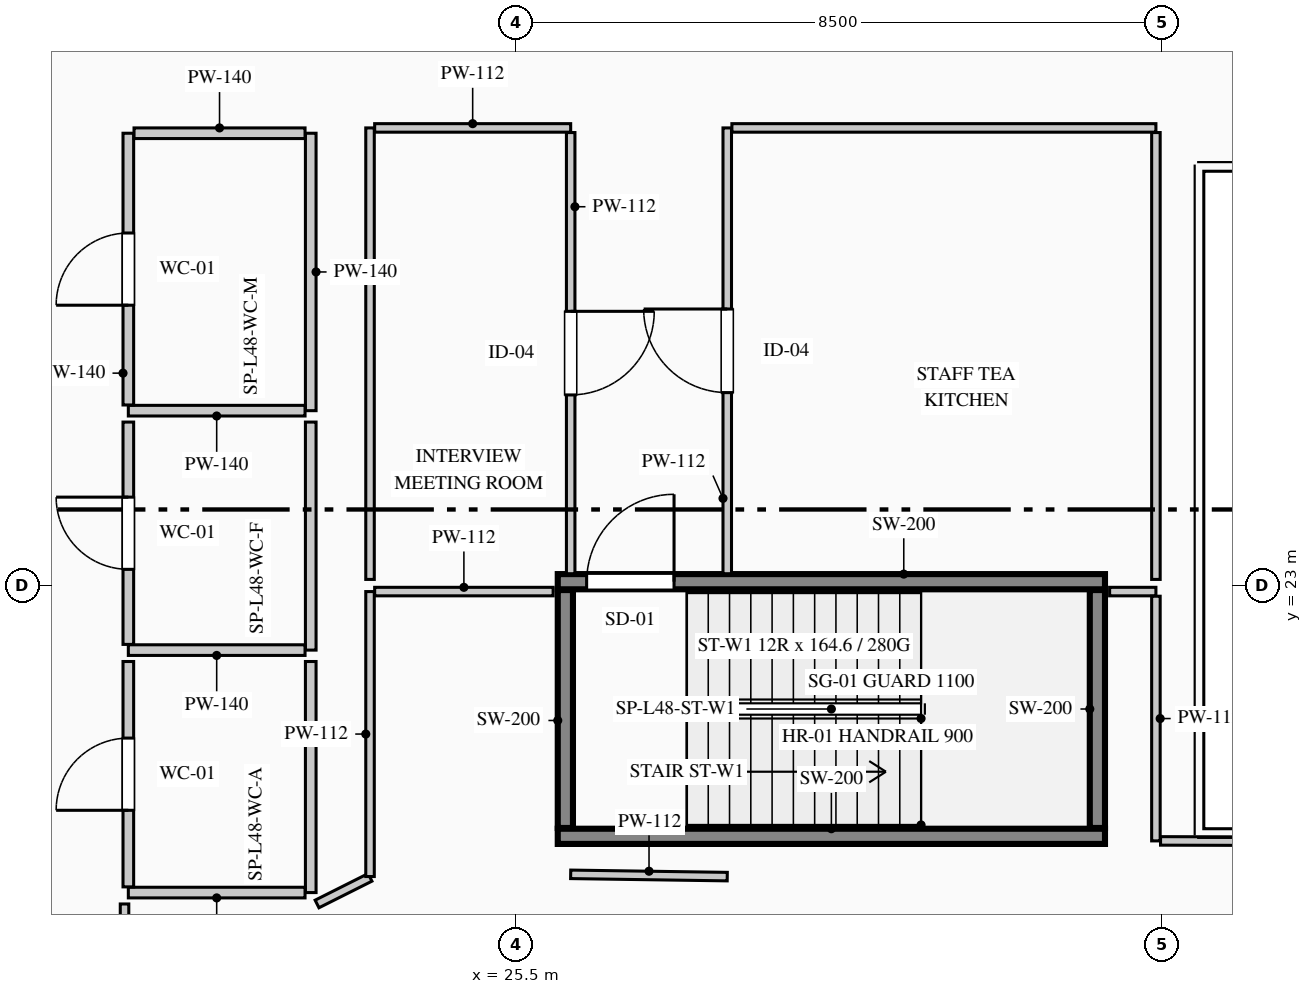
"""IFC4 building model, lengths in metres.
Left out: names, types, materials, properties, quantities, classifications, styles, units other than length and angle.
Written with IfcOpenShell. Run it as: python <this file> out.ifc"""

import sys

from ifc_helpers import new_model, si_unit, direction, frame, frame_2d, origin, place, context, subcontext, project, spatial, rectangle, extrude, element, fill, save


model = new_model("IFC4")
c1 = context("Model", 3, precision=1e-05, world=origin(), true_north=direction((0.0, 1.0)))
c2 = subcontext(c1, "Body", "Model", "MODEL_VIEW")
j1 = project(units=[si_unit("LENGTHUNIT", "METRE"), si_unit("PLANEANGLEUNIT", "RADIAN")], contexts=[c1])
p1 = place(None, origin())
s1 = spatial("IfcSite", under=j1, at=p1, CompositionType="ELEMENT")
p2 = place(p1, origin())
s2 = spatial("IfcBuilding", under=s1, at=p2, CompositionType="ELEMENT")
p3 = place(p2, frame((0.0, 0.0, 203.5)))
s3 = spatial("IfcBuildingStorey", under=s2, at=p3, CompositionType="ELEMENT", Elevation=203.5)
p4 = place(p3, frame((26.05, 19.7, 0.0), z_axis=(0.0, 0.0, 1.0), x_axis=(1.0, 0.0, 0.0)))
e1 = element("IfcWall", 1, at=p4, inside=s3, PredefinedType="SHEAR", context=c2, shape_type="SweptSolid", body=[
    extrude(rectangle(XDim=7.2, YDim=0.2, at=frame_2d((3.6, 0.0))), origin(), (0.0, 0.0, 1.0), 3.95),
])
p5 = place(p3, frame((26.05, 23.05, 0.0), z_axis=(0.0, 0.0, 1.0), x_axis=(1.0, 0.0, 0.0)))
e2 = element("IfcWall", 2, at=p5, inside=s3, PredefinedType="SHEAR", context=c2, shape_type="SweptSolid", body=[
    extrude(rectangle(XDim=7.2, YDim=0.2, at=frame_2d((3.6, 0.0))), origin(), (0.0, 0.0, 1.0), 3.95),
])
p6 = place(p5, frame((0.38, 0.0, 0.0)))
e3 = element("IfcOpeningElement", 3, at=p6, cuts=e2, PredefinedType="OPENING", context=c2, shape_type="SweptSolid", body=[
    extrude(rectangle(XDim=1.15, YDim=2.2, at=frame_2d((0.575, 1.1))), frame((0.0, 0.11, 0.0), z_axis=(0.0, -1.0, 0.0), x_axis=(1.0, 0.0, 0.0)), (0.0, 0.0, 1.0), 0.22),
])
for number, where, z_axis, x_axis in (
    (4, (26.15, 19.81, 0.0), (0.0, 0.0, 1.0), (0.0, 1.0, 0.0)),
    (5, (33.15, 19.81, 0.0), (0.0, 0.0, 1.0), (0.0, 1.0, 0.0)),
):
    element("IfcWall", number, at=place(p3, frame(where, z_axis=z_axis, x_axis=x_axis)), inside=s3, PredefinedType="SHEAR", context=c2, shape_type="SweptSolid", body=[
        extrude(rectangle(XDim=3.13, YDim=0.2, at=frame_2d((1.565, 0.0))), origin(), (0.0, 0.0, 1.0), 3.95),
    ])
p7 = place(p3, frame((22.8, 28.95, 0.0), z_axis=(0.0, 0.0, 1.0), x_axis=(0.0, -1.0, 0.0)))
e6 = element("IfcWall", 6, at=p7, inside=s3, PredefinedType="PARTITIONING", context=c2, shape_type="SweptSolid", body=[
    extrude(rectangle(XDim=3.65, YDim=0.14, at=frame_2d((1.825, 0.0))), origin(), (0.0, 0.0, 1.0), 3.285),
])
p8 = place(p3, frame((22.725, 25.3, 0.0), z_axis=(0.0, 0.0, 1.0), x_axis=(-1.0, 0.0, 0.0)))
e7 = element("IfcWall", 7, at=p8, inside=s3, PredefinedType="PARTITIONING", context=c2, shape_type="SweptSolid", body=[
    extrude(rectangle(XDim=2.325, YDim=0.14, at=frame_2d((1.163, 0.0))), origin(), (0.0, 0.0, 1.0), 3.7),
])
p9 = place(p3, frame((20.4, 25.375, 0.0), z_axis=(0.0, 0.0, 1.0), x_axis=(0.0, 1.0, 0.0)))
e8 = element("IfcWall", 8, at=p9, inside=s3, PredefinedType="PARTITIONING", context=c2, shape_type="SweptSolid", body=[
    extrude(rectangle(XDim=3.575, YDim=0.14, at=frame_2d((1.788, 0.0))), origin(), (0.0, 0.0, 1.0), 3.7),
])
p10 = place(p9, frame((1.312, 0.0, 0.0)))
e9 = element("IfcOpeningElement", 9, at=p10, cuts=e8, PredefinedType="OPENING", context=c2, shape_type="SweptSolid", body=[
    extrude(rectangle(XDim=0.95, YDim=2.15, at=frame_2d((0.475, 1.075))), frame((0.0, 0.08, 0.0), z_axis=(0.0, -1.0, 0.0), x_axis=(1.0, 0.0, 0.0)), (0.0, 0.0, 1.0), 0.16),
])
p11 = place(p3, frame((20.475, 28.95, 0.0), z_axis=(0.0, 0.0, 1.0), x_axis=(1.0, 0.0, 0.0)))
e10 = element("IfcWall", 10, at=p11, inside=s3, PredefinedType="PARTITIONING", context=c2, shape_type="SweptSolid", body=[
    extrude(rectangle(XDim=2.25, YDim=0.14, at=frame_2d((1.125, 0.0))), origin(), (0.0, 0.0, 1.0), 3.7),
])
p12 = place(p3, frame((22.8, 25.15, 0.0), z_axis=(0.0, 0.0, 1.0), x_axis=(0.0, -1.0, 0.0)))
e11 = element("IfcWall", 11, at=p12, inside=s3, PredefinedType="PARTITIONING", context=c2, shape_type="SweptSolid", body=[
    extrude(rectangle(XDim=3.0, YDim=0.14, at=frame_2d((1.5, 0.0))), origin(), (0.0, 0.0, 1.0), 3.285),
])
p13 = place(p3, frame((22.725, 22.15, 0.0), z_axis=(0.0, 0.0, 1.0), x_axis=(-1.0, 0.0, 0.0)))
e12 = element("IfcWall", 12, at=p13, inside=s3, PredefinedType="PARTITIONING", context=c2, shape_type="SweptSolid", body=[
    extrude(rectangle(XDim=2.325, YDim=0.14, at=frame_2d((1.163, 0.0))), origin(), (0.0, 0.0, 1.0), 3.7),
])
p14 = place(p3, frame((20.4, 22.225, 0.0), z_axis=(0.0, 0.0, 1.0), x_axis=(0.0, 1.0, 0.0)))
e13 = element("IfcWall", 13, at=p14, inside=s3, PredefinedType="PARTITIONING", context=c2, shape_type="SweptSolid", body=[
    extrude(rectangle(XDim=2.925, YDim=0.14, at=frame_2d((1.462, 0.0))), origin(), (0.0, 0.0, 1.0), 3.7),
])
p15 = place(p14, frame((0.988, 0.0, 0.0)))
e14 = element("IfcOpeningElement", 14, at=p15, cuts=e13, PredefinedType="OPENING", context=c2, shape_type="SweptSolid", body=[
    extrude(rectangle(XDim=0.95, YDim=2.15, at=frame_2d((0.475, 1.075))), frame((0.0, 0.08, 0.0), z_axis=(0.0, -1.0, 0.0), x_axis=(1.0, 0.0, 0.0)), (0.0, 0.0, 1.0), 0.16),
])
p16 = place(p3, frame((22.8, 22.0, 0.0), z_axis=(0.0, 0.0, 1.0), x_axis=(0.0, -1.0, 0.0)))
e15 = element("IfcWall", 15, at=p16, inside=s3, PredefinedType="PARTITIONING", context=c2, shape_type="SweptSolid", body=[
    extrude(rectangle(XDim=3.04, YDim=0.14, at=frame_2d((1.52, 0.0))), origin(), (0.0, 0.0, 1.0), 3.285),
])
p17 = place(p3, frame((22.725, 18.96, 0.0), z_axis=(0.0, 0.0, 1.0), x_axis=(-1.0, 0.0, 0.0)))
e16 = element("IfcWall", 16, at=p17, inside=s3, PredefinedType="PARTITIONING", context=c2, shape_type="SweptSolid", body=[
    extrude(rectangle(XDim=2.325, YDim=0.14, at=frame_2d((1.163, 0.0))), origin(), (0.0, 0.0, 1.0), 3.7),
])
p18 = place(p3, frame((20.4, 19.035, 0.0), z_axis=(0.0, 0.0, 1.0), x_axis=(0.0, 1.0, 0.0)))
e17 = element("IfcWall", 17, at=p18, inside=s3, PredefinedType="PARTITIONING", context=c2, shape_type="SweptSolid", body=[
    extrude(rectangle(XDim=2.965, YDim=0.14, at=frame_2d((1.482, 0.0))), origin(), (0.0, 0.0, 1.0), 3.7),
])
p19 = place(p18, frame((1.008, 0.0, 0.0)))
e18 = element("IfcOpeningElement", 18, at=p19, cuts=e17, PredefinedType="OPENING", context=c2, shape_type="SweptSolid", body=[
    extrude(rectangle(XDim=0.95, YDim=2.15, at=frame_2d((0.475, 1.075))), frame((0.0, 0.08, 0.0), z_axis=(0.0, -1.0, 0.0), x_axis=(1.0, 0.0, 0.0)), (0.0, 0.0, 1.0), 0.16),
])
p20 = place(p3, frame((33.311, 22.92, 0.0), z_axis=(0.0, 0.0, 1.0), x_axis=(1.0, 0.0, 0.0)))
e19 = element("IfcWall", 19, at=p20, inside=s3, PredefinedType="PARTITIONING", context=c2, shape_type="SweptSolid", body=[
    extrude(rectangle(XDim=0.609, YDim=0.112, at=frame_2d((0.305, 0.0))), origin(), (0.0, 0.0, 1.0), 3.7),
])
p21 = place(p3, frame((33.92, 22.859, 0.0), z_axis=(0.0, 0.0, 1.0), x_axis=(0.0, -1.0, 0.0)))
e20 = element("IfcWall", 20, at=p21, inside=s3, PredefinedType="PARTITIONING", context=c2, shape_type="SweptSolid", body=[
    extrude(rectangle(XDim=3.219, YDim=0.112, at=frame_2d((1.609, 0.0))), origin(), (0.0, 0.0, 1.0), 2.885),
])
p22 = place(p3, frame((33.981, 19.64, 0.0), z_axis=(0.0, 0.0, 1.0), x_axis=(0.999996388808, -0.002687447056, 0.0)))
e21 = element("IfcWall", 21, at=p22, inside=s3, PredefinedType="PARTITIONING", context=c2, shape_type="SweptSolid", body=[
    extrude(rectangle(XDim=9.175, YDim=0.112, at=frame_2d((4.588, 0.0))), origin(), (0.0, 0.0, 1.0), 3.7),
])
p23 = place(p3, frame((20.35, 12.8, 0.0), z_axis=(0.0, 0.0, 1.0), x_axis=(0.0, 1.0, 0.0)))
e22 = element("IfcWall", 22, at=p23, inside=s3, PredefinedType="PARTITIONING", context=c2, shape_type="SweptSolid", body=[
    extrude(rectangle(XDim=6.01, YDim=0.112, at=frame_2d((3.005, 0.0))), origin(), (0.0, 0.0, 1.0), 3.7),
])
p24 = place(p23, frame((2.455, 0.0, 0.0)))
e23 = element("IfcOpeningElement", 23, at=p24, cuts=e22, PredefinedType="OPENING", context=c2, shape_type="SweptSolid", body=[
    extrude(rectangle(XDim=1.1, YDim=2.2, at=frame_2d((0.55, 1.1))), frame((0.0, 0.066, 0.0), z_axis=(0.0, -1.0, 0.0), x_axis=(1.0, 0.0, 0.0)), (0.0, 0.0, 1.0), 0.132),
])
p25 = place(p3, frame((22.883, 18.81, 0.0), z_axis=(0.0, 0.0, 1.0), x_axis=(0.893737436086, 0.448590453909, 0.0)))
e24 = element("IfcWall", 24, at=p25, inside=s3, PredefinedType="PARTITIONING", context=c2, shape_type="SweptSolid", body=[
    extrude(rectangle(XDim=0.78, YDim=0.112, at=frame_2d((0.39, 0.0))), origin(), (0.0, 0.0, 1.0), 3.7),
])
p26 = place(p3, frame((23.58, 19.171, 0.0), z_axis=(0.0, 0.0, 1.0), x_axis=(0.0, 1.0, 0.0)))
e25 = element("IfcWall", 25, at=p26, inside=s3, PredefinedType="PARTITIONING", context=c2, shape_type="SweptSolid", body=[
    extrude(rectangle(XDim=3.749, YDim=0.112, at=frame_2d((1.875, 0.0))), origin(), (0.0, 0.0, 1.0), 3.7),
])
p27 = place(p3, frame((23.641, 22.92, 0.0), z_axis=(0.0, 0.0, 1.0), x_axis=(1.0, 0.0, 0.0)))
e26 = element("IfcWall", 26, at=p27, inside=s3, PredefinedType="PARTITIONING", context=c2, shape_type="SweptSolid", body=[
    extrude(rectangle(XDim=2.348, YDim=0.112, at=frame_2d((1.174, 0.0))), origin(), (0.0, 0.0, 1.0), 3.7),
])
p28 = place(p3, frame((26.22, 19.2, 0.0), z_axis=(0.0, 0.0, 1.0), x_axis=(0.999893773718, -0.014575365509, 0.0)))
e27 = element("IfcWall", 27, at=p28, inside=s3, PredefinedType="PARTITIONING", context=c2, shape_type="SweptSolid", body=[
    extrude(rectangle(XDim=2.06, YDim=0.112, at=frame_2d((1.03, 0.0))), origin(), (0.0, 0.0, 1.0), 3.7),
])
p29 = place(p3, frame((23.58, 23.08, 0.0), z_axis=(0.0, 0.0, 1.0), x_axis=(0.0, 1.0, 0.0)))
e28 = element("IfcWall", 28, at=p29, inside=s3, PredefinedType="PARTITIONING", context=c2, shape_type="SweptSolid", body=[
    extrude(rectangle(XDim=5.94, YDim=0.112, at=frame_2d((2.97, 0.0))), origin(), (0.0, 0.0, 1.0), 3.7),
])
p30 = place(p3, frame((23.641, 29.02, 0.0), z_axis=(0.0, 0.0, 1.0), x_axis=(1.0, 0.0, 0.0)))
e29 = element("IfcWall", 29, at=p30, inside=s3, PredefinedType="PARTITIONING", context=c2, shape_type="SweptSolid", body=[
    extrude(rectangle(XDim=2.579, YDim=0.112, at=frame_2d((1.29, 0.0))), origin(), (0.0, 0.0, 1.0), 3.485),
])
p31 = place(p3, frame((26.22, 28.959, 0.0), z_axis=(0.0, 0.0, 1.0), x_axis=(0.0, -1.0, 0.0)))
e30 = element("IfcWall", 30, at=p31, inside=s3, PredefinedType="PARTITIONING", context=c2, shape_type="SweptSolid", body=[
    extrude(rectangle(XDim=5.804, YDim=0.112, at=frame_2d((2.902, 0.0))), origin(), (0.0, 0.0, 1.0), 3.7),
])
p32 = place(p31, frame((2.352, 0.0, 0.0)))
e31 = element("IfcOpeningElement", 31, at=p32, cuts=e30, PredefinedType="OPENING", context=c2, shape_type="SweptSolid", body=[
    extrude(rectangle(XDim=1.1, YDim=2.2, at=frame_2d((0.55, 1.1))), frame((0.0, 0.066, 0.0), z_axis=(0.0, -1.0, 0.0), x_axis=(1.0, 0.0, 0.0)), (0.0, 0.0, 1.0), 0.132),
])
p33 = place(p3, frame((28.28, 23.155, 0.0), z_axis=(0.0, 0.0, 1.0), x_axis=(0.0, 1.0, 0.0)))
e32 = element("IfcWall", 32, at=p33, inside=s3, PredefinedType="PARTITIONING", context=c2, shape_type="SweptSolid", body=[
    extrude(rectangle(XDim=5.865, YDim=0.112, at=frame_2d((2.933, 0.0))), origin(), (0.0, 0.0, 1.0), 3.7),
])
p34 = place(p33, frame((2.383, 0.0, 0.0)))
e33 = element("IfcOpeningElement", 33, at=p34, cuts=e32, PredefinedType="OPENING", context=c2, shape_type="SweptSolid", body=[
    extrude(rectangle(XDim=1.1, YDim=2.2, at=frame_2d((0.55, 1.1))), frame((0.0, 0.066, 0.0), z_axis=(0.0, -1.0, 0.0), x_axis=(1.0, 0.0, 0.0)), (0.0, 0.0, 1.0), 0.132),
])
p35 = place(p3, frame((28.341, 29.02, 0.0), z_axis=(0.0, 0.0, 1.0), x_axis=(1.0, 0.0, 0.0)))
e34 = element("IfcWall", 34, at=p35, inside=s3, PredefinedType="PARTITIONING", context=c2, shape_type="SweptSolid", body=[
    extrude(rectangle(XDim=5.579, YDim=0.112, at=frame_2d((2.79, 0.0))), origin(), (0.0, 0.0, 1.0), 3.485),
])
p36 = place(p3, frame((33.92, 28.959, 0.0), z_axis=(0.0, 0.0, 1.0), x_axis=(0.0, -1.0, 0.0)))
e35 = element("IfcWall", 35, at=p36, inside=s3, PredefinedType="PARTITIONING", context=c2, shape_type="SweptSolid", body=[
    extrude(rectangle(XDim=5.879, YDim=0.112, at=frame_2d((2.939, 0.0))), origin(), (0.0, 0.0, 1.0), 2.885),
])
p37 = place(p6, origin())
e36 = element("IfcDoor", 36, at=p37, inside=s3, OperationType="SINGLE_SWING_RIGHT", PredefinedType="DOOR", context=c2, shape_type="SweptSolid", body=[
    extrude(rectangle(XDim=1.15, YDim=2.2, at=frame_2d((0.575, 1.1))), frame((0.0, 0.025, 0.0), z_axis=(0.0, -1.0, 0.0), x_axis=(1.0, 0.0, 0.0)), (0.0, 0.0, 1.0), 0.05),
])
fill(e3, e36)
p38 = place(p10, origin())
e37 = element("IfcDoor", 37, at=p38, inside=s3, OperationType="SINGLE_SWING_LEFT", PredefinedType="DOOR", context=c2, shape_type="SweptSolid", body=[
    extrude(rectangle(XDim=0.95, YDim=2.15, at=frame_2d((0.475, 1.075))), frame((0.0, 0.025, 0.0), z_axis=(0.0, -1.0, 0.0), x_axis=(1.0, 0.0, 0.0)), (0.0, 0.0, 1.0), 0.05),
])
fill(e9, e37)
p39 = place(p15, origin())
e38 = element("IfcDoor", 38, at=p39, inside=s3, OperationType="SINGLE_SWING_RIGHT", PredefinedType="DOOR", context=c2, shape_type="SweptSolid", body=[
    extrude(rectangle(XDim=0.95, YDim=2.15, at=frame_2d((0.475, 1.075))), frame((0.0, 0.025, 0.0), z_axis=(0.0, -1.0, 0.0), x_axis=(1.0, 0.0, 0.0)), (0.0, 0.0, 1.0), 0.05),
])
fill(e14, e38)
p40 = place(p19, origin())
e39 = element("IfcDoor", 39, at=p40, inside=s3, OperationType="SINGLE_SWING_LEFT", PredefinedType="DOOR", context=c2, shape_type="SweptSolid", body=[
    extrude(rectangle(XDim=0.95, YDim=2.15, at=frame_2d((0.475, 1.075))), frame((0.0, 0.025, 0.0), z_axis=(0.0, -1.0, 0.0), x_axis=(1.0, 0.0, 0.0)), (0.0, 0.0, 1.0), 0.05),
])
fill(e18, e39)
p41 = place(p32, origin())
e40 = element("IfcDoor", 40, at=p41, inside=s3, OperationType="SINGLE_SWING_LEFT", PredefinedType="DOOR", context=c2, shape_type="SweptSolid", body=[
    extrude(rectangle(XDim=1.1, YDim=2.2, at=frame_2d((0.55, 1.1))), frame((0.0, 0.025, 0.0), z_axis=(0.0, -1.0, 0.0), x_axis=(1.0, 0.0, 0.0)), (0.0, 0.0, 1.0), 0.05),
])
fill(e31, e40)
p42 = place(p34, origin())
e41 = element("IfcDoor", 41, at=p42, inside=s3, OperationType="SINGLE_SWING_RIGHT", PredefinedType="DOOR", context=c2, shape_type="SweptSolid", body=[
    extrude(rectangle(XDim=1.1, YDim=2.2, at=frame_2d((0.55, 1.1))), frame((0.0, 0.025, 0.0), z_axis=(0.0, -1.0, 0.0), x_axis=(1.0, 0.0, 0.0)), (0.0, 0.0, 1.0), 0.05),
])
fill(e33, e41)
save(model, sys.argv[1])
